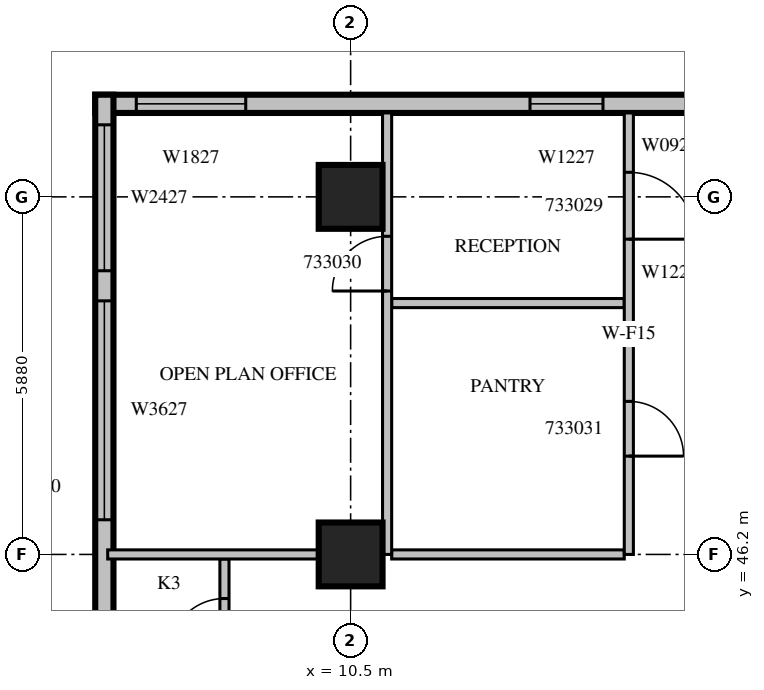
"""IFC4 building model, lengths in metres.
Left out: names, types, materials, properties, quantities, classifications, styles, units other than length and angle.
Written with IfcOpenShell. Run it as: python <this file> out.ifc"""

import sys

from ifc_helpers import new_model, si_unit, direction, frame, frame_2d, origin, origin_2d, place, context, subcontext, project, spatial, rectangle, extrude, source, transform, mapped, element, fill, save


model = new_model("IFC4")
c1 = context("Model", 3, precision=1e-05, world=origin(), true_north=direction((0.0, 1.0)))
c2 = subcontext(c1, "Body", "Model", "MODEL_VIEW")
j1 = project(units=[si_unit("LENGTHUNIT", "METRE"), si_unit("PLANEANGLEUNIT", "RADIAN")], contexts=[c1])
p1 = place(None, origin())
s1 = spatial("IfcSite", under=j1, at=p1, CompositionType="ELEMENT")
p2 = place(p1, origin())
s2 = spatial("IfcBuilding", under=s1, at=p2, CompositionType="ELEMENT")
p3 = place(p2, frame((0.0, 0.0, 149.7)))
s3 = spatial("IfcBuildingStorey", under=s2, at=p3, CompositionType="ELEMENT", Elevation=149.7)
m1 = source(origin(), c2, "Body", "SweptSolid", [
    extrude(rectangle(XDim=1.05, YDim=1.05, at=origin_2d()), origin(), (0.0, 0.0, 1.0), 4.2),
])
for number, where, z_axis, x_axis in (
    (1, (10.5, 46.2, 0.0), (0.0, 0.0, 1.0), (1.0, 0.0, 0.0)),
    (2, (10.5, 52.08, 0.0), (0.0, 0.0, 1.0), (1.0, 0.0, 0.0)),
):
    element("IfcColumn", number, at=place(p3, frame(where, z_axis=z_axis, x_axis=x_axis)), inside=s3, PredefinedType="COLUMN", context=c2, shape_type="MappedRepresentation", body=[
        mapped(m1, transform((0.0, 0.0, 0.0), scale=1.0)),
    ])
m2 = source(origin(), c2, "Body", "SweptSolid", [
    extrude(rectangle(XDim=10.5, YDim=0.3, at=frame_2d((5.25, 0.0))), origin(), (0.0, 0.0, 1.0), 3.8),
])
p4 = place(p3, frame((16.8, 53.61, 0.0), z_axis=(0.0, 0.0, 1.0), x_axis=(-1.0, 0.0, 0.0)))
e3 = element("IfcWall", 3, at=p4, inside=s3, PredefinedType="STANDARD", context=c2, shape_type="MappedRepresentation", body=[
    mapped(m2, transform((0.0, 0.0, 0.0), scale=1.0)),
])
m3 = source(origin(), c2, "Body", "SweptSolid", [
    extrude(rectangle(XDim=1.2, YDim=2.7, at=frame_2d((0.6, 1.35))), frame((0.0, 0.16, 0.0), z_axis=(0.0, -1.0, 0.0), x_axis=(1.0, 0.0, 0.0)), (0.0, 0.0, 1.0), 0.32),
])
p5 = place(p4, frame((2.15, 0.0, 0.6)))
e4 = element("IfcOpeningElement", 4, at=p5, cuts=e3, PredefinedType="OPENING", context=c2, shape_type="MappedRepresentation", body=[
    mapped(m3, transform((0.0, 0.0, 0.0), scale=1.0)),
])
m4 = source(origin(), c2, "Body", "SweptSolid", [
    extrude(rectangle(XDim=1.8, YDim=2.7, at=frame_2d((0.9, 1.35))), frame((0.0, 0.16, 0.0), z_axis=(0.0, -1.0, 0.0), x_axis=(1.0, 0.0, 0.0)), (0.0, 0.0, 1.0), 0.32),
])
p6 = place(p4, frame((8.025, 0.0, 0.6)))
e5 = element("IfcOpeningElement", 5, at=p6, cuts=e3, PredefinedType="OPENING", context=c2, shape_type="MappedRepresentation", body=[
    mapped(m4, transform((0.0, 0.0, 0.0), scale=1.0)),
])
m5 = source(origin(), c2, "Body", "SweptSolid", [
    extrude(rectangle(XDim=9.91, YDim=0.3, at=frame_2d((4.955, 0.0))), origin(), (0.0, 0.0, 1.0), 3.8),
])
p7 = place(p3, frame((6.45, 53.76, 0.0), z_axis=(0.0, 0.0, 1.0), x_axis=(0.0, -1.0, 0.0)))
e6 = element("IfcWall", 6, at=p7, inside=s3, PredefinedType="STANDARD", context=c2, shape_type="MappedRepresentation", body=[
    mapped(m5, transform((0.0, 0.0, 0.0), scale=1.0)),
])
m6 = source(origin(), c2, "Body", "SweptSolid", [
    extrude(rectangle(XDim=3.6, YDim=2.7, at=frame_2d((1.8, 1.35))), frame((0.0, 0.16, 0.0), z_axis=(0.0, -1.0, 0.0), x_axis=(1.0, 0.0, 0.0)), (0.0, 0.0, 1.0), 0.32),
])
p8 = place(p7, frame((3.39, 0.0, 0.6)))
e7 = element("IfcOpeningElement", 7, at=p8, cuts=e6, PredefinedType="OPENING", context=c2, shape_type="MappedRepresentation", body=[
    mapped(m6, transform((0.0, 0.0, 0.0), scale=1.0)),
])
m7 = source(origin(), c2, "Body", "SweptSolid", [
    extrude(rectangle(XDim=2.4, YDim=2.7, at=frame_2d((1.2, 1.35))), frame((0.0, 0.16, 0.0), z_axis=(0.0, -1.0, 0.0), x_axis=(1.0, 0.0, 0.0)), (0.0, 0.0, 1.0), 0.32),
])
p9 = place(p7, frame((0.495, 0.0, 0.6)))
e8 = element("IfcOpeningElement", 8, at=p9, cuts=e6, PredefinedType="OPENING", context=c2, shape_type="MappedRepresentation", body=[
    mapped(m7, transform((0.0, 0.0, 0.0), scale=1.0)),
])
m8 = source(origin(), c2, "Body", "SweptSolid", [
    extrude(rectangle(XDim=2.2, YDim=0.15, at=frame_2d((1.1, 0.0))), origin(), (0.0, 0.0, 1.0), 3.8),
])
p10 = place(p3, frame((8.425, 43.925, 0.0), z_axis=(0.0, 0.0, 1.0), x_axis=(0.0, 1.0, 0.0)))
e9 = element("IfcWall", 9, at=p10, inside=s3, PredefinedType="PARTITIONING", context=c2, shape_type="MappedRepresentation", body=[
    mapped(m8, transform((0.0, 0.0, 0.0), scale=1.0)),
])
m9 = source(origin(), c2, "Body", "SweptSolid", [
    extrude(rectangle(XDim=0.9, YDim=2.1, at=frame_2d((0.45, 1.05))), frame((0.0, 0.085, 0.0), z_axis=(0.0, -1.0, 0.0), x_axis=(1.0, 0.0, 0.0)), (0.0, 0.0, 1.0), 0.17),
])
p11 = place(p10, frame((0.65, 0.0, 0.0)))
e10 = element("IfcOpeningElement", 10, at=p11, cuts=e9, PredefinedType="OPENING", context=c2, shape_type="MappedRepresentation", body=[
    mapped(m9, transform((0.0, 0.0, 0.0), scale=1.0)),
])
m10 = source(origin(), c2, "Body", "SweptSolid", [
    extrude(rectangle(XDim=3.825, YDim=0.15, at=frame_2d((1.913, 0.0))), origin(), (0.0, 0.0, 1.0), 3.8),
])
p12 = place(p3, frame((15.0, 50.334, 0.0), z_axis=(0.0, 0.0, 1.0), x_axis=(-1.0, 0.0, 0.0)))
e11 = element("IfcWall", 11, at=p12, inside=s3, PredefinedType="PARTITIONING", context=c2, shape_type="MappedRepresentation", body=[
    mapped(m10, transform((0.0, 0.0, 0.0), scale=1.0)),
])
m11 = source(origin(), c2, "Body", "SweptSolid", [
    extrude(rectangle(XDim=3.471, YDim=0.15, at=frame_2d((1.736, 0.0))), origin(), (0.0, 0.0, 1.0), 3.8),
])
p13 = place(p3, frame((9.976, 46.2, 0.0), z_axis=(0.0, 0.0, 1.0), x_axis=(-1.0, 0.0, 0.0)))
e12 = element("IfcWall", 12, at=p13, inside=s3, PredefinedType="PARTITIONING", context=c2, shape_type="MappedRepresentation", body=[
    mapped(m11, transform((0.0, 0.0, 0.0), scale=1.0)),
])
p14 = place(p3, frame((15.0, 46.2, 0.0), z_axis=(0.0, 0.0, 1.0), x_axis=(-1.0, 0.0, 0.0)))
e13 = element("IfcWall", 13, at=p14, inside=s3, PredefinedType="PARTITIONING", context=c2, shape_type="MappedRepresentation", body=[
    mapped(m10, transform((0.0, 0.0, 0.0), scale=1.0)),
])
m12 = source(origin(), c2, "Body", "SweptSolid", [
    extrude(rectangle(XDim=7.26, YDim=0.15, at=frame_2d((3.63, 0.0))), origin(), (0.0, 0.0, 1.0), 3.8),
])
p15 = place(p3, frame((11.1, 46.2, 0.0), z_axis=(0.0, 0.0, 1.0), x_axis=(0.0, 1.0, 0.0)))
e14 = element("IfcWall", 14, at=p15, inside=s3, PredefinedType="PARTITIONING", context=c2, shape_type="MappedRepresentation", body=[
    mapped(m12, transform((0.0, 0.0, 0.0), scale=1.0)),
])
p16 = place(p15, frame((4.332, 0.0, 0.0)))
e15 = element("IfcOpeningElement", 15, at=p16, cuts=e14, PredefinedType="OPENING", context=c2, shape_type="MappedRepresentation", body=[
    mapped(m9, transform((0.0, 0.0, 0.0), scale=1.0)),
])
p17 = place(p3, frame((15.075, 46.2, 0.0), z_axis=(0.0, 0.0, 1.0), x_axis=(0.0, 1.0, 0.0)))
e16 = element("IfcWall", 16, at=p17, inside=s3, PredefinedType="PARTITIONING", context=c2, shape_type="MappedRepresentation", body=[
    mapped(m12, transform((0.0, 0.0, 0.0), scale=1.0)),
])
m13 = source(origin(), c2, "Body", "SweptSolid", [
    extrude(rectangle(XDim=1.1, YDim=2.1, at=frame_2d((0.55, 1.05))), frame((0.0, 0.085, 0.0), z_axis=(0.0, -1.0, 0.0), x_axis=(1.0, 0.0, 0.0)), (0.0, 0.0, 1.0), 0.17),
])
p18 = place(p17, frame((5.184, 0.0, 0.0)))
e17 = element("IfcOpeningElement", 17, at=p18, cuts=e16, PredefinedType="OPENING", context=c2, shape_type="MappedRepresentation", body=[
    mapped(m13, transform((0.0, 0.0, 0.0), scale=1.0)),
])
p19 = place(p17, frame((1.617, 0.0, 0.0)))
e18 = element("IfcOpeningElement", 18, at=p19, cuts=e16, PredefinedType="OPENING", context=c2, shape_type="MappedRepresentation", body=[
    mapped(m9, transform((0.0, 0.0, 0.0), scale=1.0)),
])
m14 = source(origin(), c2, "Body", "SweptSolid", [
    extrude(rectangle(XDim=1.2, YDim=2.7, at=frame_2d((0.6, 1.35))), frame((0.0, 0.03, 0.0), z_axis=(0.0, -1.0, 0.0), x_axis=(1.0, 0.0, 0.0)), (0.0, 0.0, 1.0), 0.06),
])
p20 = place(p5, origin())
e19 = element("IfcWindow", 19, at=p20, inside=s3, PartitioningType="SINGLE_PANEL", PredefinedType="WINDOW", context=c2, shape_type="MappedRepresentation", body=[
    mapped(m14, transform((0.0, 0.0, 0.0), scale=1.0)),
])
fill(e4, e19)
m15 = source(origin(), c2, "Body", "SweptSolid", [
    extrude(rectangle(XDim=1.8, YDim=2.7, at=frame_2d((0.9, 1.35))), frame((0.0, 0.03, 0.0), z_axis=(0.0, -1.0, 0.0), x_axis=(1.0, 0.0, 0.0)), (0.0, 0.0, 1.0), 0.06),
])
p21 = place(p6, origin())
e20 = element("IfcWindow", 20, at=p21, inside=s3, PartitioningType="SINGLE_PANEL", PredefinedType="WINDOW", context=c2, shape_type="MappedRepresentation", body=[
    mapped(m15, transform((0.0, 0.0, 0.0), scale=1.0)),
])
fill(e5, e20)
m16 = source(origin(), c2, "Body", "SweptSolid", [
    extrude(rectangle(XDim=3.6, YDim=2.7, at=frame_2d((1.8, 1.35))), frame((0.0, 0.03, 0.0), z_axis=(0.0, -1.0, 0.0), x_axis=(1.0, 0.0, 0.0)), (0.0, 0.0, 1.0), 0.06),
])
p22 = place(p8, origin())
e21 = element("IfcWindow", 21, at=p22, inside=s3, PartitioningType="SINGLE_PANEL", PredefinedType="WINDOW", context=c2, shape_type="MappedRepresentation", body=[
    mapped(m16, transform((0.0, 0.0, 0.0), scale=1.0)),
])
fill(e7, e21)
m17 = source(origin(), c2, "Body", "SweptSolid", [
    extrude(rectangle(XDim=2.4, YDim=2.7, at=frame_2d((1.2, 1.35))), frame((0.0, 0.03, 0.0), z_axis=(0.0, -1.0, 0.0), x_axis=(1.0, 0.0, 0.0)), (0.0, 0.0, 1.0), 0.06),
])
p23 = place(p9, origin())
e22 = element("IfcWindow", 22, at=p23, inside=s3, PartitioningType="SINGLE_PANEL", PredefinedType="WINDOW", context=c2, shape_type="MappedRepresentation", body=[
    mapped(m17, transform((0.0, 0.0, 0.0), scale=1.0)),
])
fill(e8, e22)
m18 = source(origin(), c2, "Body", "SweptSolid", [
    extrude(rectangle(XDim=0.9, YDim=2.1, at=frame_2d((0.45, 1.05))), frame((0.0, 0.025, 0.0), z_axis=(0.0, -1.0, 0.0), x_axis=(1.0, 0.0, 0.0)), (0.0, 0.0, 1.0), 0.05),
])
p24 = place(p11, origin())
e23 = element("IfcDoor", 23, at=p24, inside=s3, OperationType="SINGLE_SWING_LEFT", PredefinedType="DOOR", context=c2, shape_type="MappedRepresentation", body=[
    mapped(m18, transform((0.0, 0.0, 0.0), scale=1.0)),
])
fill(e10, e23)
m19 = source(origin(), c2, "Body", "SweptSolid", [
    extrude(rectangle(XDim=1.1, YDim=2.1, at=frame_2d((0.55, 1.05))), frame((0.0, 0.025, 0.0), z_axis=(0.0, -1.0, 0.0), x_axis=(1.0, 0.0, 0.0)), (0.0, 0.0, 1.0), 0.05),
])
p25 = place(p18, origin())
e24 = element("IfcDoor", 24, at=p25, inside=s3, OperationType="SINGLE_SWING_RIGHT", PredefinedType="DOOR", context=c2, shape_type="MappedRepresentation", body=[
    mapped(m19, transform((0.0, 0.0, 0.0), scale=1.0)),
])
fill(e17, e24)
p26 = place(p16, origin())
e25 = element("IfcDoor", 25, at=p26, inside=s3, OperationType="SINGLE_SWING_LEFT", PredefinedType="DOOR", context=c2, shape_type="MappedRepresentation", body=[
    mapped(m18, transform((0.0, 0.0, 0.0), scale=1.0)),
])
fill(e15, e25)
p27 = place(p19, origin())
e26 = element("IfcDoor", 26, at=p27, inside=s3, OperationType="SINGLE_SWING_RIGHT", PredefinedType="DOOR", context=c2, shape_type="MappedRepresentation", body=[
    mapped(m18, transform((0.0, 0.0, 0.0), scale=1.0)),
])
fill(e18, e26)
save(model, sys.argv[1])
